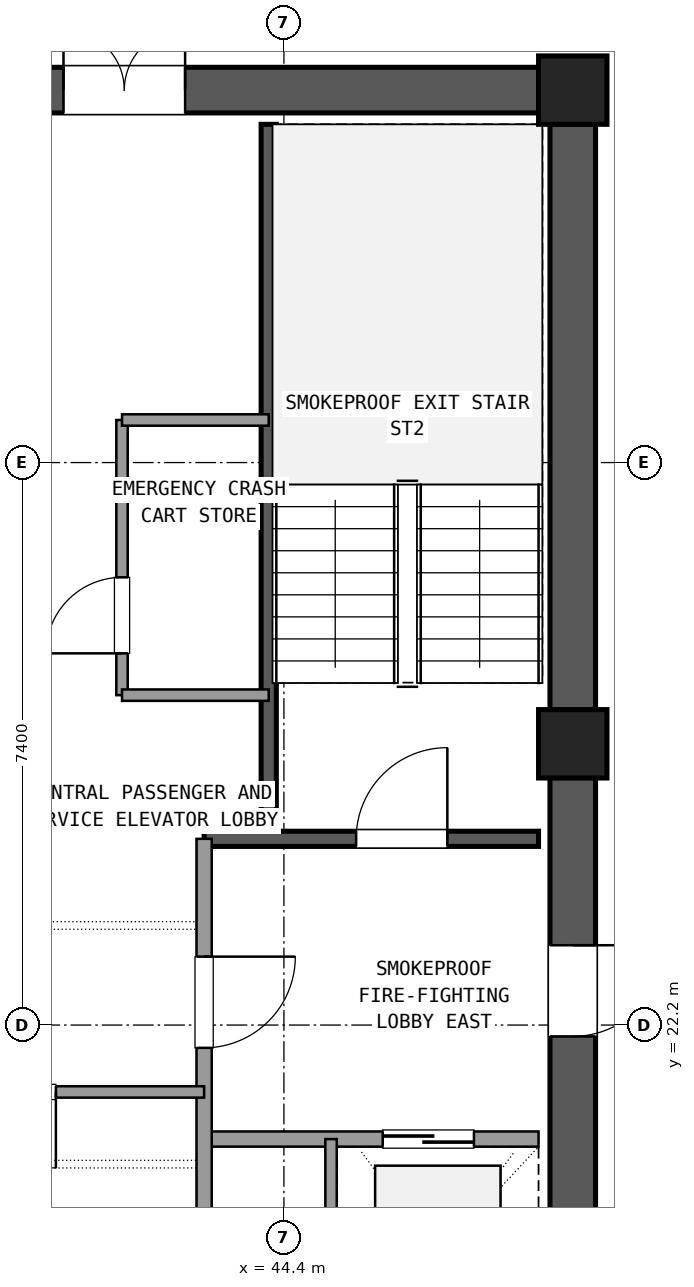
"""IFC4 building model, lengths in metres.
Left out: names, types, materials, properties, quantities, classifications, styles, units other than length and angle.
Written with IfcOpenShell. Run it as: python <this file> out.ifc"""

import sys

from ifc_helpers import new_model, si_unit, direction, frame, frame_2d, origin, origin_2d, place, context, subcontext, project, spatial, rectangle, extrude, element, fill, save


model = new_model("IFC4")
c1 = context("Model", 3, precision=1e-05, world=origin(), true_north=direction((0.0, 1.0)))
c2 = subcontext(c1, "Body", "Model", "MODEL_VIEW")
j1 = project(units=[si_unit("LENGTHUNIT", "METRE"), si_unit("PLANEANGLEUNIT", "RADIAN")], contexts=[c1])
p1 = place(None, origin())
s1 = spatial("IfcSite", under=j1, at=p1, CompositionType="ELEMENT")
p2 = place(p1, origin())
s2 = spatial("IfcBuilding", under=s1, at=p2, CompositionType="ELEMENT")
p3 = place(p2, frame((0.0, 0.0, 225.18)))
s3 = spatial("IfcBuildingStorey", under=s2, at=p3, CompositionType="ELEMENT", Elevation=225.18)
for number, where, z_axis, x_axis in (
    (1, (48.2, 25.9, 0.0), (0.0, 0.0, 1.0), (1.0, 0.0, 0.0)),
    (2, (48.2, 34.5, 0.0), (0.0, 0.0, 1.0), (1.0, 0.0, 0.0)),
):
    element("IfcColumn", number, at=place(p3, frame(where, z_axis=z_axis, x_axis=x_axis)), inside=s3, PredefinedType="COLUMN", context=c2, shape_type="SweptSolid", body=[
        extrude(rectangle(XDim=0.9, YDim=0.9, at=origin_2d()), origin(), (0.0, 0.0, 1.0), 3.6),
    ])
p4 = place(p3, frame((48.2, 17.745, 0.0), z_axis=(0.0, 0.0, 1.0), x_axis=(0.0, 1.0, 0.0)))
e3 = element("IfcWall", 3, at=p4, inside=s3, PredefinedType="SHEAR", context=c2, shape_type="SweptSolid", body=[
    extrude(rectangle(XDim=7.71, YDim=0.6, at=frame_2d((3.855, 0.0))), origin(), (0.0, 0.0, 1.0), 3.32),
])
p5 = place(p4, frame((4.305, 0.0, 0.0)))
e4 = element("IfcOpeningElement", 4, at=p5, cuts=e3, PredefinedType="OPENING", context=c2, shape_type="SweptSolid", body=[
    extrude(rectangle(XDim=1.2, YDim=2.15, at=frame_2d((0.6, 1.075))), frame((0.0, 0.31, 0.0), z_axis=(0.0, -1.0, 0.0), x_axis=(1.0, 0.0, 0.0)), (0.0, 0.0, 1.0), 0.62),
])
p6 = place(p3, frame((48.2, 26.345, 0.0), z_axis=(0.0, 0.0, 1.0), x_axis=(0.0, 1.0, 0.0)))
e5 = element("IfcWall", 5, at=p6, inside=s3, PredefinedType="SHEAR", context=c2, shape_type="SweptSolid", body=[
    extrude(rectangle(XDim=7.71, YDim=0.6, at=frame_2d((3.855, 0.0))), origin(), (0.0, 0.0, 1.0), 3.32),
])
p7 = place(p3, frame((47.755, 34.5, 0.0), z_axis=(0.0, 0.0, 1.0), x_axis=(-1.0, 0.0, 0.0)))
e6 = element("IfcWall", 6, at=p7, inside=s3, PredefinedType="SHEAR", context=c2, shape_type="SweptSolid", body=[
    extrude(rectangle(XDim=10.31, YDim=0.6, at=frame_2d((5.155, 0.0))), origin(), (0.0, 0.0, 1.0), 3.32),
])
p8 = place(p7, frame((4.655, 0.0, 0.0)))
e7 = element("IfcOpeningElement", 7, at=p8, cuts=e6, PredefinedType="OPENING", context=c2, shape_type="SweptSolid", body=[
    extrude(rectangle(XDim=1.6, YDim=2.2, at=frame_2d((0.8, 1.1))), frame((0.0, 0.31, 0.0), z_axis=(0.0, -1.0, 0.0), x_axis=(1.0, 0.0, 0.0)), (0.0, 0.0, 1.0), 0.62),
])
p9 = place(p3, frame((44.2, 24.65, 0.0), z_axis=(0.0, 0.0, 1.0), x_axis=(0.0, 1.0, 0.0)))
e8 = element("IfcWall", 8, at=p9, inside=s3, PredefinedType="SHEAR", context=c2, shape_type="SweptSolid", body=[
    extrude(rectangle(XDim=9.4, YDim=0.2, at=frame_2d((4.7, 0.0))), origin(), (0.0, 0.0, 1.0), 3.32),
])
p10 = place(p3, frame((43.35, 24.65, 0.0), z_axis=(0.0, 0.0, 1.0), x_axis=(1.0, 0.0, 0.0)))
e9 = element("IfcWall", 9, at=p10, inside=s3, PredefinedType="SHEAR", context=c2, shape_type="SweptSolid", body=[
    extrude(rectangle(XDim=4.4, YDim=0.2, at=frame_2d((2.2, 0.0))), origin(), (0.0, 0.0, 1.0), 3.32),
])
p11 = place(p10, frame((2.0, 0.0, 0.0)))
e10 = element("IfcOpeningElement", 10, at=p11, cuts=e9, PredefinedType="OPENING", context=c2, shape_type="SweptSolid", body=[
    extrude(rectangle(XDim=1.2, YDim=2.15, at=frame_2d((0.6, 1.075))), frame((0.0, 0.11, 0.0), z_axis=(0.0, -1.0, 0.0), x_axis=(1.0, 0.0, 0.0)), (0.0, 0.0, 1.0), 0.22),
])
p12 = place(p3, frame((43.35, 20.7, 0.0), z_axis=(0.0, 0.0, 1.0), x_axis=(1.0, 0.0, 0.0)))
e11 = element("IfcWall", 11, at=p12, inside=s3, PredefinedType="SOLIDWALL", context=c2, shape_type="SweptSolid", body=[
    extrude(rectangle(XDim=4.4, YDim=0.2, at=frame_2d((2.2, 0.0))), origin(), (0.0, 0.0, 1.0), 2.61),
])
p13 = place(p12, frame((2.35, 0.0, 0.0)))
e12 = element("IfcOpeningElement", 12, at=p13, cuts=e11, PredefinedType="OPENING", context=c2, shape_type="SweptSolid", body=[
    extrude(rectangle(XDim=1.2, YDim=2.15, at=frame_2d((0.6, 1.075))), frame((0.0, 0.11, 0.0), z_axis=(0.0, -1.0, 0.0), x_axis=(1.0, 0.0, 0.0)), (0.0, 0.0, 1.0), 0.22),
])
p14 = place(p3, frame((43.35, 17.75, 0.0), z_axis=(0.0, 0.0, 1.0), x_axis=(0.0, 1.0, 0.0)))
e13 = element("IfcWall", 13, at=p14, inside=s3, PredefinedType="SOLIDWALL", context=c2, shape_type="SweptSolid", body=[
    extrude(rectangle(XDim=6.9, YDim=0.2, at=frame_2d((3.45, 0.0))), origin(), (0.0, 0.0, 1.0), 2.61),
])
p15 = place(p14, frame((4.15, 0.0, 0.0)))
e14 = element("IfcOpeningElement", 14, at=p15, cuts=e13, PredefinedType="OPENING", context=c2, shape_type="SweptSolid", body=[
    extrude(rectangle(XDim=1.2, YDim=2.15, at=frame_2d((0.6, 1.075))), frame((0.0, 0.11, 0.0), z_axis=(0.0, -1.0, 0.0), x_axis=(1.0, 0.0, 0.0)), (0.0, 0.0, 1.0), 0.22),
])
p16 = place(p3, frame((45.02, 17.75, 0.0), z_axis=(0.0, 0.0, 1.0), x_axis=(0.0, 1.0, 0.0)))
e15 = element("IfcWall", 15, at=p16, inside=s3, PredefinedType="PARTITIONING", context=c2, shape_type="SweptSolid", body=[
    extrude(rectangle(XDim=2.95, YDim=0.15, at=frame_2d((1.475, 0.0))), origin(), (0.0, 0.0, 1.0), 2.61),
])
p17 = place(p3, frame((37.25, 21.32, 0.0), z_axis=(0.0, 0.0, 1.0), x_axis=(1.0, 0.0, 0.0)))
e16 = element("IfcWall", 16, at=p17, inside=s3, PredefinedType="PARTITIONING", context=c2, shape_type="SweptSolid", body=[
    extrude(rectangle(XDim=6.1, YDim=0.15, at=frame_2d((3.05, 0.0))), origin(), (0.0, 0.0, 1.0), 2.61),
])
p18 = place(p17, frame((0.55, 0.0, 0.0)))
e17 = element("IfcOpeningElement", 17, at=p18, cuts=e16, PredefinedType="OPENING", context=c2, shape_type="SweptSolid", body=[
    extrude(rectangle(XDim=1.0, YDim=2.15, at=frame_2d((0.5, 1.075))), frame((0.0, 0.085, 0.0), z_axis=(0.0, -1.0, 0.0), x_axis=(1.0, 0.0, 0.0)), (0.0, 0.0, 1.0), 0.17),
])
p19 = place(p17, frame((3.15, 0.0, 0.0)))
e18 = element("IfcOpeningElement", 18, at=p19, cuts=e16, PredefinedType="OPENING", context=c2, shape_type="SweptSolid", body=[
    extrude(rectangle(XDim=1.0, YDim=2.15, at=frame_2d((0.5, 1.075))), frame((0.0, 0.085, 0.0), z_axis=(0.0, -1.0, 0.0), x_axis=(1.0, 0.0, 0.0)), (0.0, 0.0, 1.0), 0.17),
])
p20 = place(p3, frame((42.27, 26.54, 0.0), z_axis=(0.0, 0.0, 1.0), x_axis=(0.0, 1.0, 0.0)))
e19 = element("IfcWall", 19, at=p20, inside=s3, PredefinedType="PARTITIONING", context=c2, shape_type="SweptSolid", body=[
    extrude(rectangle(XDim=3.62, YDim=0.15, at=frame_2d((1.81, 0.0))), origin(), (0.0, 0.0, 1.0), 2.61),
])
p21 = place(p20, frame((0.55, 0.0, 0.0)))
e20 = element("IfcOpeningElement", 20, at=p21, cuts=e19, PredefinedType="OPENING", context=c2, shape_type="SweptSolid", body=[
    extrude(rectangle(XDim=1.0, YDim=2.15, at=frame_2d((0.5, 1.075))), frame((0.0, 0.085, 0.0), z_axis=(0.0, -1.0, 0.0), x_axis=(1.0, 0.0, 0.0)), (0.0, 0.0, 1.0), 0.17),
])
for number, where, z_axis, x_axis in (
    (21, (42.27, 26.54, 0.0), (0.0, 0.0, 1.0), (1.0, 0.0, 0.0)),
    (22, (42.27, 30.16, 0.0), (0.0, 0.0, 1.0), (1.0, 0.0, 0.0)),
):
    element("IfcWall", number, at=place(p3, frame(where, z_axis=z_axis, x_axis=x_axis)), inside=s3, PredefinedType="PARTITIONING", context=c2, shape_type="SweptSolid", body=[
        extrude(rectangle(XDim=1.93, YDim=0.15, at=frame_2d((0.965, 0.0))), origin(), (0.0, 0.0, 1.0), 2.61),
    ])
p22 = place(p11, origin())
e23 = element("IfcDoor", 23, at=p22, inside=s3, OperationType="SINGLE_SWING_RIGHT", PredefinedType="DOOR", context=c2, shape_type="SweptSolid", body=[
    extrude(rectangle(XDim=1.2, YDim=2.15, at=frame_2d((0.6, 1.075))), frame((0.0, 0.025, 0.0), z_axis=(0.0, -1.0, 0.0), x_axis=(1.0, 0.0, 0.0)), (0.0, 0.0, 1.0), 0.05),
])
fill(e10, e23)
p23 = place(p13, origin())
e24 = element("IfcDoor", 24, at=p23, inside=s3, OperationType="SLIDING_TO_RIGHT", PredefinedType="DOOR", context=c2, shape_type="SweptSolid", body=[
    extrude(rectangle(XDim=1.2, YDim=2.15, at=frame_2d((0.6, 1.075))), frame((0.0, 0.025, 0.0), z_axis=(0.0, -1.0, 0.0), x_axis=(1.0, 0.0, 0.0)), (0.0, 0.0, 1.0), 0.05),
])
fill(e12, e24)
p24 = place(p15, frame((1.2, 0.0, 0.0), z_axis=(0.0, 0.0, 1.0), x_axis=(-1.0, 0.0, 0.0)))
e25 = element("IfcDoor", 25, at=p24, inside=s3, OperationType="SINGLE_SWING_RIGHT", PredefinedType="DOOR", context=c2, shape_type="SweptSolid", body=[
    extrude(rectangle(XDim=1.2, YDim=2.15, at=frame_2d((0.6, 1.075))), frame((0.0, 0.025, 0.0), z_axis=(0.0, -1.0, 0.0), x_axis=(1.0, 0.0, 0.0)), (0.0, 0.0, 1.0), 0.05),
])
fill(e14, e25)
p25 = place(p5, frame((1.2, 0.0, 0.0), z_axis=(0.0, 0.0, 1.0), x_axis=(-1.0, 0.0, 0.0)))
e26 = element("IfcDoor", 26, at=p25, inside=s3, OperationType="SINGLE_SWING_RIGHT", PredefinedType="DOOR", context=c2, shape_type="SweptSolid", body=[
    extrude(rectangle(XDim=1.2, YDim=2.15, at=frame_2d((0.6, 1.075))), frame((0.0, 0.025, 0.0), z_axis=(0.0, -1.0, 0.0), x_axis=(1.0, 0.0, 0.0)), (0.0, 0.0, 1.0), 0.05),
])
fill(e4, e26)
p26 = place(p8, frame((1.6, 0.0, 0.0), z_axis=(0.0, 0.0, 1.0), x_axis=(-1.0, 0.0, 0.0)))
e27 = element("IfcDoor", 27, at=p26, inside=s3, OperationType="DOUBLE_DOOR_SINGLE_SWING", PredefinedType="DOOR", context=c2, shape_type="SweptSolid", body=[
    extrude(rectangle(XDim=1.6, YDim=2.2, at=frame_2d((0.8, 1.1))), frame((0.0, 0.025, 0.0), z_axis=(0.0, -1.0, 0.0), x_axis=(1.0, 0.0, 0.0)), (0.0, 0.0, 1.0), 0.05),
])
fill(e7, e27)
p27 = place(p19, frame((1.0, 0.0, 0.0), z_axis=(0.0, 0.0, 1.0), x_axis=(-1.0, 0.0, 0.0)))
e28 = element("IfcDoor", 28, at=p27, inside=s3, OperationType="SINGLE_SWING_RIGHT", PredefinedType="DOOR", context=c2, shape_type="SweptSolid", body=[
    extrude(rectangle(XDim=1.0, YDim=2.15, at=frame_2d((0.5, 1.075))), frame((0.0, 0.025, 0.0), z_axis=(0.0, -1.0, 0.0), x_axis=(1.0, 0.0, 0.0)), (0.0, 0.0, 1.0), 0.05),
])
fill(e18, e28)
p28 = place(p21, origin())
e29 = element("IfcDoor", 29, at=p28, inside=s3, OperationType="SINGLE_SWING_LEFT", PredefinedType="DOOR", context=c2, shape_type="SweptSolid", body=[
    extrude(rectangle(XDim=1.0, YDim=2.15, at=frame_2d((0.5, 1.075))), frame((0.0, 0.025, 0.0), z_axis=(0.0, -1.0, 0.0), x_axis=(1.0, 0.0, 0.0)), (0.0, 0.0, 1.0), 0.05),
])
fill(e20, e29)
save(model, sys.argv[1])
